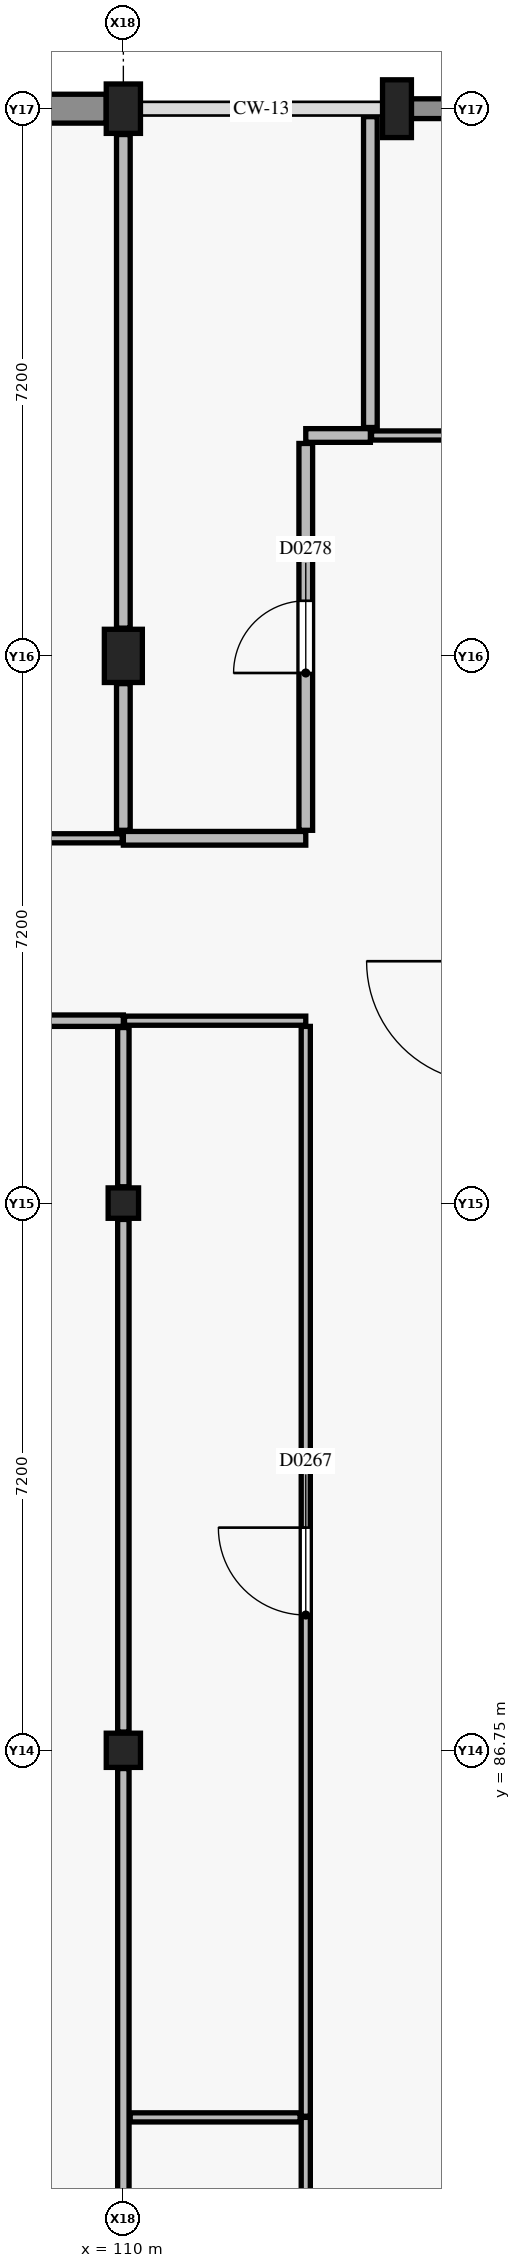
"""IFC4 building model, lengths in metres.
Left out: names, types, materials, properties, quantities, classifications, styles, units other than length and angle.
Written with IfcOpenShell. Run it as: python <this file> out.ifc"""

import sys

from ifc_helpers import new_model, si_unit, direction, frame, frame_2d, origin, origin_2d, place, context, subcontext, project, spatial, rectangle, extrude, element, fill, save


model = new_model("IFC4")
c1 = context("Model", 3, precision=1e-05, world=origin(), true_north=direction((0.0, 1.0)))
c2 = subcontext(c1, "Body", "Model", "MODEL_VIEW")
j1 = project(units=[si_unit("LENGTHUNIT", "METRE"), si_unit("PLANEANGLEUNIT", "RADIAN")], contexts=[c1])
p1 = place(None, origin())
s1 = spatial("IfcSite", under=j1, at=p1, CompositionType="ELEMENT")
p2 = place(p1, origin())
s2 = spatial("IfcBuilding", under=s1, at=p2, CompositionType="ELEMENT")
p3 = place(p2, frame((0.0, 0.0, 13.2)))
s3 = spatial("IfcBuildingStorey", under=s2, at=p3, CompositionType="ELEMENT", Elevation=13.2)
p4 = place(p3, frame((110.0, 86.75, 0.0), z_axis=(0.0, 0.0, 1.0), x_axis=(1.0, 0.0, 0.0)))
e1 = element("IfcColumn", 1, at=p4, inside=s3, PredefinedType="COLUMN", context=c2, shape_type="SweptSolid", body=[
    extrude(rectangle(XDim=0.45, YDim=0.45, at=origin_2d()), origin(), (0.0, 0.0, 1.0), 4.05),
])
p5 = place(p3, frame((110.0, 93.95, 0.0), z_axis=(0.0, 0.0, 1.0), x_axis=(1.0, 0.0, 0.0)))
e2 = element("IfcColumn", 2, at=p5, inside=s3, PredefinedType="COLUMN", context=c2, shape_type="SweptSolid", body=[
    extrude(rectangle(XDim=0.4, YDim=0.4, at=origin_2d()), origin(), (0.0, 0.0, 1.0), 4.2),
])
p6 = place(p3, frame((110.0, 101.15, 0.0), z_axis=(0.0, 0.0, 1.0), x_axis=(1.0, 0.0, 0.0)))
e3 = element("IfcColumn", 3, at=p6, inside=s3, PredefinedType="COLUMN", context=c2, shape_type="SweptSolid", body=[
    extrude(rectangle(XDim=0.5, YDim=0.7, at=origin_2d()), origin(), (0.0, 0.0, 1.0), 4.2),
])
p7 = place(p3, frame((110.0, 108.35, 0.0), z_axis=(0.0, 0.0, 1.0), x_axis=(1.0, 0.0, 0.0)))
e4 = element("IfcColumn", 4, at=p7, inside=s3, PredefinedType="COLUMN", context=c2, shape_type="SweptSolid", body=[
    extrude(rectangle(XDim=0.45, YDim=0.65, at=origin_2d()), origin(), (0.0, 0.0, 1.0), 4.2),
])
p8 = place(p3, frame((113.6, 108.35, 0.0), z_axis=(0.0, 0.0, 1.0), x_axis=(1.0, 0.0, 0.0)))
e5 = element("IfcColumn", 5, at=p8, inside=s3, PredefinedType="PILASTER", context=c2, shape_type="SweptSolid", body=[
    extrude(rectangle(XDim=0.38, YDim=0.76, at=origin_2d()), origin(), (0.0, 0.0, 1.0), 4.2),
])
p9 = place(p3, frame((106.8, 108.35, 0.0), z_axis=(0.0, 0.0, 1.0), x_axis=(1.0, 0.0, 0.0)))
e6 = element("IfcWall", 6, at=p9, inside=s3, PredefinedType="USERDEFINED", context=c2, shape_type="SweptSolid", body=[
    extrude(rectangle(XDim=2.975, YDim=0.38, at=frame_2d((1.487, 0.0))), origin(), (0.0, 0.0, 1.0), 3.13),
])
p10 = place(p9, frame((0.738, 0.0, 0.9)))
e7 = element("IfcOpeningElement", 7, at=p10, cuts=e6, PredefinedType="OPENING", context=c2, shape_type="SweptSolid", body=[
    extrude(rectangle(XDim=1.5, YDim=1.5, at=frame_2d((0.75, 0.75))), frame((0.0, 0.2, 0.0), z_axis=(0.0, -1.0, 0.0), x_axis=(1.0, 0.0, 0.0)), (0.0, 0.0, 1.0), 0.4),
])
p11 = place(p3, frame((113.79, 108.35, 0.0), z_axis=(0.0, 0.0, 1.0), x_axis=(1.0, 0.0, 0.0)))
e8 = element("IfcWall", 8, at=p11, inside=s3, PredefinedType="SOLIDWALL", context=c2, shape_type="SweptSolid", body=[
    extrude(rectangle(XDim=3.11, YDim=0.26, at=frame_2d((1.555, 0.0))), origin(), (0.0, 0.0, 1.0), 3.13),
])
p12 = place(p11, frame((0.655, 0.0, 0.9)))
e9 = element("IfcOpeningElement", 9, at=p12, cuts=e8, PredefinedType="OPENING", context=c2, shape_type="SweptSolid", body=[
    extrude(rectangle(XDim=1.8, YDim=1.5, at=frame_2d((0.9, 0.75))), frame((0.0, 0.14, 0.0), z_axis=(0.0, -1.0, 0.0), x_axis=(1.0, 0.0, 0.0)), (0.0, 0.0, 1.0), 0.28),
])
p13 = place(p3, frame((110.0, 98.75, 0.0), z_axis=(0.0, 0.0, 1.0), x_axis=(1.0, 0.0, 0.0)))
e10 = element("IfcWall", 10, at=p13, inside=s3, PredefinedType="PLUMBINGWALL", context=c2, shape_type="SweptSolid", body=[
    extrude(rectangle(XDim=2.4, YDim=0.18, at=frame_2d((1.2, 0.0))), origin(), (0.0, 0.0, 1.0), 3.355),
])
p14 = place(p3, frame((112.4, 104.05, 0.0), z_axis=(0.0, 0.0, 1.0), x_axis=(1.0, 0.0, 0.0)))
e11 = element("IfcWall", 11, at=p14, inside=s3, PredefinedType="PLUMBINGWALL", context=c2, shape_type="SweptSolid", body=[
    extrude(rectangle(XDim=0.85, YDim=0.18, at=frame_2d((0.425, 0.0))), origin(), (0.0, 0.0, 1.0), 3.95),
])
p15 = place(p3, frame((112.4, 98.855, 0.0), z_axis=(0.0, 0.0, 1.0), x_axis=(0.0, 1.0, 0.0)))
e12 = element("IfcWall", 12, at=p15, inside=s3, PredefinedType="PLUMBINGWALL", context=c2, shape_type="SweptSolid", body=[
    extrude(rectangle(XDim=5.09, YDim=0.18, at=frame_2d((2.545, 0.0))), origin(), (0.0, 0.0, 1.0), 3.355),
])
p16 = place(p15, frame((2.07, 0.0, 0.0)))
e13 = element("IfcOpeningElement", 13, at=p16, cuts=e12, PredefinedType="OPENING", context=c2, shape_type="SweptSolid", body=[
    extrude(rectangle(XDim=0.95, YDim=2.1, at=frame_2d((0.475, 1.05))), frame((0.0, 0.1, 0.0), z_axis=(0.0, -1.0, 0.0), x_axis=(1.0, 0.0, 0.0)), (0.0, 0.0, 1.0), 0.2),
])
p17 = place(p3, frame((102.815, 96.35, 0.0), z_axis=(0.0, 0.0, 1.0), x_axis=(1.0, 0.0, 0.0)))
e14 = element("IfcWall", 14, at=p17, inside=s3, PredefinedType="PARTITIONING", context=c2, shape_type="SweptSolid", body=[
    extrude(rectangle(XDim=7.185, YDim=0.15, at=frame_2d((3.593, 0.0))), origin(), (0.0, 0.0, 1.0), 3.355),
])
p18 = place(p17, frame((2.968, 0.0, 0.0)))
e15 = element("IfcOpeningElement", 15, at=p18, cuts=e14, PredefinedType="OPENING", context=c2, shape_type="SweptSolid", body=[
    extrude(rectangle(XDim=1.25, YDim=2.15, at=frame_2d((0.625, 1.075))), frame((0.0, 0.085, 0.0), z_axis=(0.0, -1.0, 0.0), x_axis=(1.0, 0.0, 0.0)), (0.0, 0.0, 1.0), 0.17),
])
p19 = place(p3, frame((112.4, 70.2, 0.0), z_axis=(0.0, 0.0, 1.0), x_axis=(0.0, 1.0, 0.0)))
e16 = element("IfcWall", 16, at=p19, inside=s3, PredefinedType="PARTITIONING", context=c2, shape_type="SweptSolid", body=[
    extrude(rectangle(XDim=11.72, YDim=0.12, at=frame_2d((5.86, 0.0))), origin(), (0.0, 0.0, 1.0), 3.48),
])
p20 = place(p19, frame((5.285, 0.0, 0.0)))
e17 = element("IfcOpeningElement", 17, at=p20, cuts=e16, PredefinedType="OPENING", context=c2, shape_type="SweptSolid", body=[
    extrude(rectangle(XDim=1.15, YDim=2.15, at=frame_2d((0.575, 1.075))), frame((0.0, 0.07, 0.0), z_axis=(0.0, -1.0, 0.0), x_axis=(1.0, 0.0, 0.0)), (0.0, 0.0, 1.0), 0.14),
])
p21 = place(p3, frame((110.015, 96.35, 0.0), z_axis=(0.0, 0.0, 1.0), x_axis=(1.0, 0.0, 0.0)))
e18 = element("IfcWall", 18, at=p21, inside=s3, PredefinedType="PARTITIONING", context=c2, shape_type="SweptSolid", body=[
    extrude(rectangle(XDim=2.385, YDim=0.12, at=frame_2d((1.192, 0.0))), origin(), (0.0, 0.0, 1.0), 3.355),
])
p22 = place(p3, frame((112.4, 81.935, 0.0), z_axis=(0.0, 0.0, 1.0), x_axis=(0.0, 1.0, 0.0)))
e19 = element("IfcWall", 19, at=p22, inside=s3, PredefinedType="PARTITIONING", context=c2, shape_type="SweptSolid", body=[
    extrude(rectangle(XDim=14.34, YDim=0.12, at=frame_2d((7.17, 0.0))), origin(), (0.0, 0.0, 1.0), 3.48),
])
p23 = place(p22, frame((6.595, 0.0, 0.0)))
e20 = element("IfcOpeningElement", 20, at=p23, cuts=e19, PredefinedType="OPENING", context=c2, shape_type="SweptSolid", body=[
    extrude(rectangle(XDim=1.15, YDim=2.15, at=frame_2d((0.575, 1.075))), frame((0.0, 0.07, 0.0), z_axis=(0.0, -1.0, 0.0), x_axis=(1.0, 0.0, 0.0)), (0.0, 0.0, 1.0), 0.14),
])
p24 = place(p3, frame((113.265, 104.05, 0.0), z_axis=(0.0, 0.0, 1.0), x_axis=(1.0, 0.0, 0.0)))
e21 = element("IfcWall", 21, at=p24, inside=s3, PredefinedType="PARTITIONING", context=c2, shape_type="SweptSolid", body=[
    extrude(rectangle(XDim=1.46, YDim=0.12, at=frame_2d((0.73, 0.0))), origin(), (0.0, 0.0, 1.0), 3.515),
])
p25 = place(p3, frame((106.85, 98.75, 0.0), z_axis=(0.0, 0.0, 1.0), x_axis=(1.0, 0.0, 0.0)))
e22 = element("IfcWall", 22, at=p25, inside=s3, PredefinedType="PARTITIONING", context=c2, shape_type="SweptSolid", body=[
    extrude(rectangle(XDim=3.135, YDim=0.12, at=frame_2d((1.567, 0.0))), origin(), (0.0, 0.0, 1.0), 3.355),
])
p26 = place(p3, frame((113.25, 104.155, 0.0), z_axis=(0.0, 0.0, 1.0), x_axis=(0.0, 1.0, 0.0)))
e23 = element("IfcWall", 23, at=p26, inside=s3, PredefinedType="PLUMBINGWALL", context=c2, shape_type="SweptSolid", body=[
    extrude(rectangle(XDim=4.09, YDim=0.18, at=frame_2d((2.045, 0.0))), origin(), (0.0, 0.0, 1.0), 3.95),
])
p27 = place(p3, frame((110.0, 98.855, 0.0), z_axis=(0.0, 0.0, 1.0), x_axis=(0.0, 1.0, 0.0)))
e24 = element("IfcWall", 24, at=p27, inside=s3, PredefinedType="PLUMBINGWALL", context=c2, shape_type="SweptSolid", body=[
    extrude(rectangle(XDim=1.93, YDim=0.18, at=frame_2d((0.965, 0.0))), origin(), (0.0, 0.0, 1.0), 3.355),
])
p28 = place(p3, frame((110.0, 101.515, 0.0), z_axis=(0.0, 0.0, 1.0), x_axis=(0.0, 1.0, 0.0)))
e25 = element("IfcWall", 25, at=p28, inside=s3, PredefinedType="PLUMBINGWALL", context=c2, shape_type="SweptSolid", body=[
    extrude(rectangle(XDim=6.495, YDim=0.18, at=frame_2d((3.248, 0.0))), origin(), (0.0, 0.0, 1.0), 3.385),
])
p29 = place(p3, frame((110.0, 79.815, 0.0), z_axis=(0.0, 0.0, 1.0), x_axis=(0.0, 1.0, 0.0)))
e26 = element("IfcWall", 26, at=p29, inside=s3, PredefinedType="PARTITIONING", context=c2, shape_type="SweptSolid", body=[
    extrude(rectangle(XDim=6.695, YDim=0.15, at=frame_2d((3.348, 0.0))), origin(), (0.0, 0.0, 1.0), 3.95),
])
p30 = place(p3, frame((110.0, 86.99, 0.0), z_axis=(0.0, 0.0, 1.0), x_axis=(0.0, 1.0, 0.0)))
e27 = element("IfcWall", 27, at=p30, inside=s3, PredefinedType="PARTITIONING", context=c2, shape_type="SweptSolid", body=[
    extrude(rectangle(XDim=6.745, YDim=0.15, at=frame_2d((3.373, 0.0))), origin(), (0.0, 0.0, 1.0), 3.95),
])
p31 = place(p3, frame((110.0, 94.165, 0.0), z_axis=(0.0, 0.0, 1.0), x_axis=(0.0, 1.0, 0.0)))
e28 = element("IfcWall", 28, at=p31, inside=s3, PredefinedType="PARTITIONING", context=c2, shape_type="SweptSolid", body=[
    extrude(rectangle(XDim=2.095, YDim=0.15, at=frame_2d((1.047, 0.0))), origin(), (0.0, 0.0, 1.0), 3.355),
])
p32 = place(p3, frame((110.09, 81.92, 0.0), z_axis=(0.0, 0.0, 1.0), x_axis=(1.0, 0.0, 0.0)))
e29 = element("IfcWall", 29, at=p32, inside=s3, PredefinedType="PARTITIONING", context=c2, shape_type="SweptSolid", body=[
    extrude(rectangle(XDim=2.235, YDim=0.12, at=frame_2d((1.117, 0.0))), origin(), (0.0, 0.0, 1.0), 3.95),
])
p33 = place(p23, origin())
e30 = element("IfcDoor", 30, at=p33, inside=s3, OperationType="SINGLE_SWING_RIGHT", PredefinedType="DOOR", context=c2, shape_type="SweptSolid", body=[
    extrude(rectangle(XDim=1.15, YDim=2.15, at=frame_2d((0.575, 1.075))), frame((0.0, 0.025, 0.0), z_axis=(0.0, -1.0, 0.0), x_axis=(1.0, 0.0, 0.0)), (0.0, 0.0, 1.0), 0.05),
])
fill(e20, e30)
p34 = place(p16, origin())
e31 = element("IfcDoor", 31, at=p34, inside=s3, OperationType="SINGLE_SWING_LEFT", PredefinedType="DOOR", context=c2, shape_type="SweptSolid", body=[
    extrude(rectangle(XDim=0.95, YDim=2.1, at=frame_2d((0.475, 1.05))), frame((0.0, 0.025, 0.0), z_axis=(0.0, -1.0, 0.0), x_axis=(1.0, 0.0, 0.0)), (0.0, 0.0, 1.0), 0.05),
])
fill(e13, e31)
save(model, sys.argv[1])
